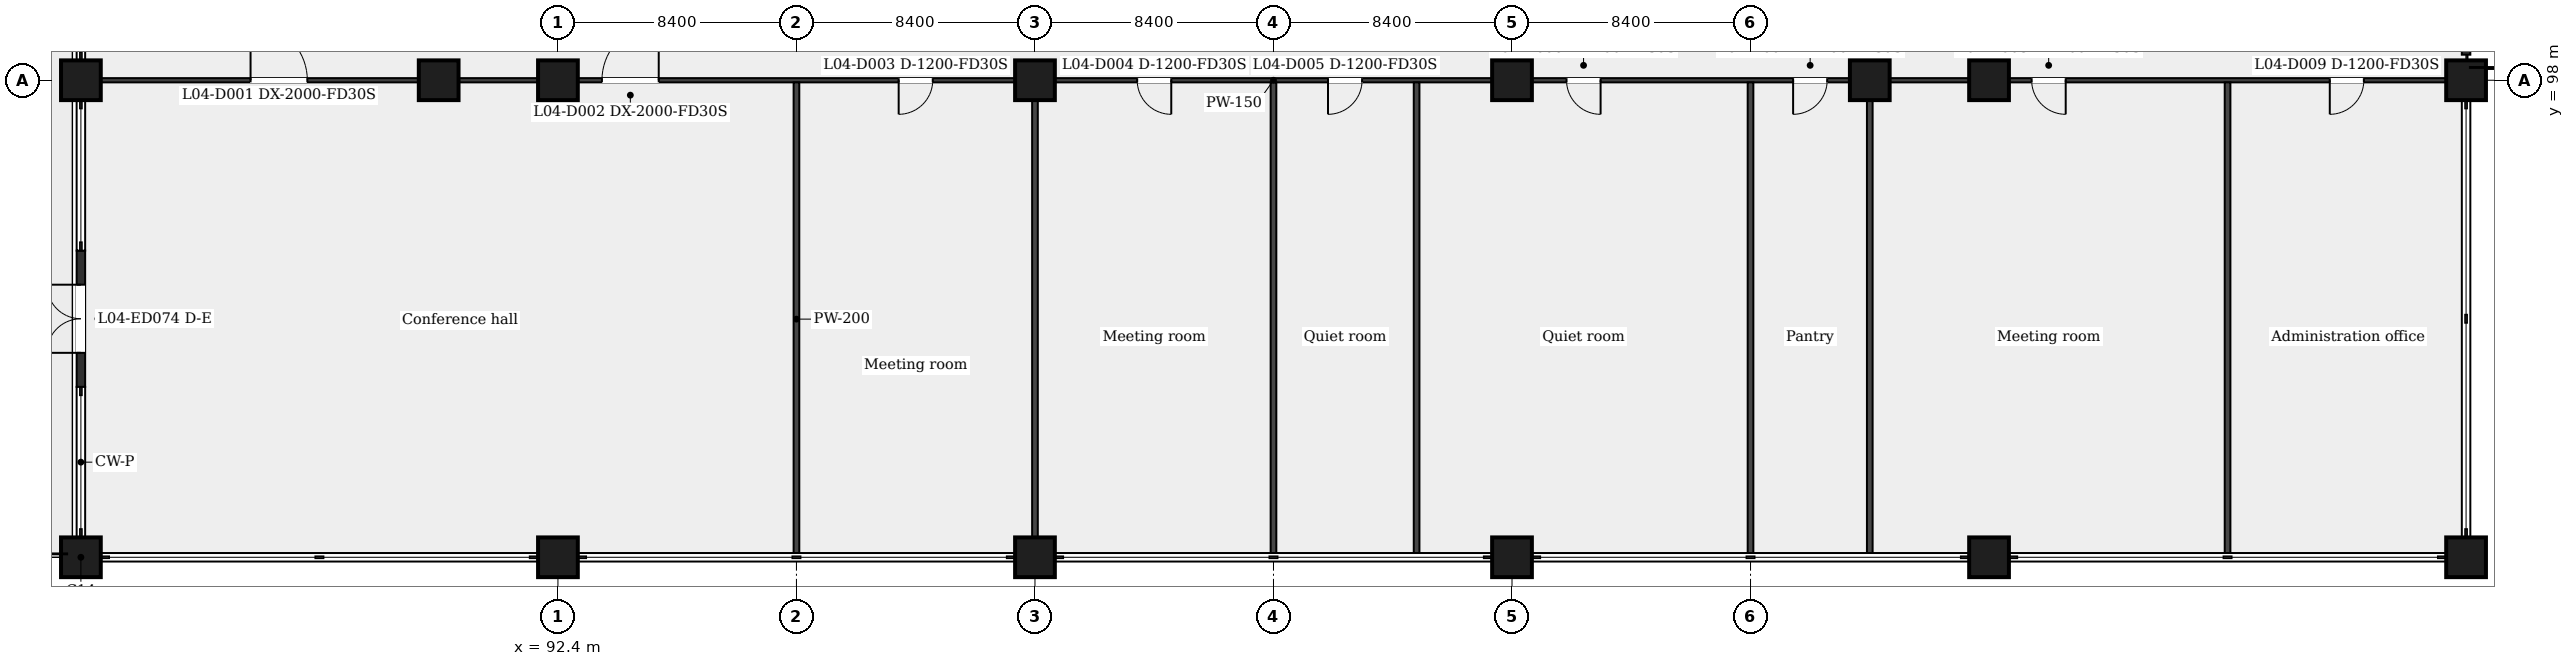
"""IFC4 building model, lengths in metres.
Left out: names, types, materials, properties, quantities, classifications, styles, units other than length and angle.
Written with IfcOpenShell. Run it as: python <this file> out.ifc"""

import sys

from ifc_helpers import new_model, si_unit, direction, frame, frame_2d, origin, origin_2d, place, context, subcontext, project, spatial, rectangle, extrude, element, fill, save


model = new_model("IFC4")
c1 = context("Model", 3, precision=1e-05, world=origin(), true_north=direction((0.0, 1.0)))
c2 = subcontext(c1, "Body", "Model", "MODEL_VIEW")
j1 = project(units=[si_unit("LENGTHUNIT", "METRE"), si_unit("PLANEANGLEUNIT", "RADIAN")], contexts=[c1])
p1 = place(None, origin())
s1 = spatial("IfcSite", under=j1, at=p1, CompositionType="ELEMENT")
p2 = place(p1, origin())
s2 = spatial("IfcBuilding", under=s1, at=p2, CompositionType="ELEMENT")
p3 = place(p2, frame((0.0, 0.0, 29.0)))
s3 = spatial("IfcBuildingStorey", under=s2, at=p3, CompositionType="ELEMENT", Elevation=29.0)
for number, where, z_axis, x_axis in (
    (1, (75.6, 81.2, 0.0), (0.0, 0.0, 1.0), (1.0, 0.0, 0.0)),
    (2, (92.4, 81.2, 0.0), (0.0, 0.0, 1.0), (1.0, 0.0, 0.0)),
    (3, (109.2, 81.2, 0.0), (0.0, 0.0, 1.0), (1.0, 0.0, 0.0)),
    (4, (126.0, 81.2, 0.0), (0.0, 0.0, 1.0), (1.0, 0.0, 0.0)),
    (5, (142.8, 81.2, 0.0), (0.0, 0.0, 1.0), (1.0, 0.0, 0.0)),
    (6, (159.6, 81.2, 0.0), (0.0, 0.0, 1.0), (1.0, 0.0, 0.0)),
    (7, (75.6, 98.0, 0.0), (0.0, 0.0, 1.0), (1.0, 0.0, 0.0)),
    (8, (88.2, 98.0, 0.0), (0.0, 0.0, 1.0), (1.0, 0.0, 0.0)),
    (9, (92.4, 98.0, 0.0), (0.0, 0.0, 1.0), (1.0, 0.0, 0.0)),
    (10, (109.2, 98.0, 0.0), (0.0, 0.0, 1.0), (1.0, 0.0, 0.0)),
    (11, (126.0, 98.0, 0.0), (0.0, 0.0, 1.0), (1.0, 0.0, 0.0)),
    (12, (138.6, 98.0, 0.0), (0.0, 0.0, 1.0), (1.0, 0.0, 0.0)),
    (13, (142.8, 98.0, 0.0), (0.0, 0.0, 1.0), (1.0, 0.0, 0.0)),
    (14, (159.6, 98.0, 0.0), (0.0, 0.0, 1.0), (1.0, 0.0, 0.0)),
):
    element("IfcColumn", number, at=place(p3, frame(where, z_axis=z_axis, x_axis=x_axis)), inside=s3, PredefinedType="COLUMN", context=c2, shape_type="SweptSolid", body=[
        extrude(rectangle(XDim=1.4, YDim=1.4, at=origin_2d()), origin(), (0.0, 0.0, 1.0), 5.0),
    ])
p4 = place(p3, frame((75.6, 87.2, 0.0), z_axis=(0.0, 0.0, 1.0), x_axis=(0.0, 1.0, 0.0)))
e15 = element("IfcWall", 15, at=p4, inside=s3, PredefinedType="SOLIDWALL", context=c2, shape_type="SweptSolid", body=[
    extrude(rectangle(XDim=4.8, YDim=0.3, at=frame_2d((2.4, 0.0))), origin(), (0.0, 0.0, 1.0), 4.4),
])
p5 = place(p4, frame((1.2, 0.0, 0.0)))
e16 = element("IfcOpeningElement", 16, at=p5, cuts=e15, PredefinedType="OPENING", context=c2, shape_type="SweptSolid", body=[
    extrude(rectangle(XDim=2.4, YDim=2.4, at=frame_2d((1.2, 1.2))), frame((0.0, 0.16, 0.0), z_axis=(0.0, -1.0, 0.0), x_axis=(1.0, 0.0, 0.0)), (0.0, 0.0, 1.0), 0.32),
])
p6 = place(p3, frame((159.6, 102.5, 0.0), z_axis=(0.0, 0.0, 1.0), x_axis=(0.0, -1.0, 0.0)))
e17 = element("IfcWall", 17, at=p6, inside=s3, PredefinedType="SOLIDWALL", context=c2, shape_type="SweptSolid", body=[
    extrude(rectangle(XDim=3.6, YDim=0.3, at=frame_2d((1.8, 0.0))), origin(), (0.0, 0.0, 1.0), 4.4),
])
p7 = place(p6, frame((0.6, 0.0, 0.0)))
e18 = element("IfcOpeningElement", 18, at=p7, cuts=e17, PredefinedType="OPENING", context=c2, shape_type="SweptSolid", body=[
    extrude(rectangle(XDim=2.4, YDim=2.4, at=frame_2d((1.2, 1.2))), frame((0.0, 0.16, 0.0), z_axis=(0.0, -1.0, 0.0), x_axis=(1.0, 0.0, 0.0)), (0.0, 0.0, 1.0), 0.32),
])
p8 = place(p3, frame((75.65, 98.0, 0.0), z_axis=(0.0, 0.0, 1.0), x_axis=(1.0, 0.0, 0.0)))
e19 = element("IfcWall", 19, at=p8, inside=s3, PredefinedType="PARTITIONING", context=c2, shape_type="SweptSolid", body=[
    extrude(rectangle(XDim=83.9, YDim=0.15, at=frame_2d((41.95, 0.0))), origin(), (0.0, 0.0, 1.0), 4.4),
])
p9 = place(p8, frame((5.925, 0.0, 0.0)))
e20 = element("IfcOpeningElement", 20, at=p9, cuts=e19, PredefinedType="OPENING", context=c2, shape_type="SweptSolid", body=[
    extrude(rectangle(XDim=2.0, YDim=2.1, at=frame_2d((1.0, 1.05))), frame((0.0, 0.085, 0.0), z_axis=(0.0, -1.0, 0.0), x_axis=(1.0, 0.0, 0.0)), (0.0, 0.0, 1.0), 0.17),
])
p10 = place(p8, frame((18.3, 0.0, 0.0)))
e21 = element("IfcOpeningElement", 21, at=p10, cuts=e19, PredefinedType="OPENING", context=c2, shape_type="SweptSolid", body=[
    extrude(rectangle(XDim=2.0, YDim=2.1, at=frame_2d((1.0, 1.05))), frame((0.0, 0.085, 0.0), z_axis=(0.0, -1.0, 0.0), x_axis=(1.0, 0.0, 0.0)), (0.0, 0.0, 1.0), 0.17),
])
p11 = place(p8, frame((28.75, 0.0, 0.0)))
e22 = element("IfcOpeningElement", 22, at=p11, cuts=e19, PredefinedType="OPENING", context=c2, shape_type="SweptSolid", body=[
    extrude(rectangle(XDim=1.2, YDim=2.1, at=frame_2d((0.6, 1.05))), frame((0.0, 0.085, 0.0), z_axis=(0.0, -1.0, 0.0), x_axis=(1.0, 0.0, 0.0)), (0.0, 0.0, 1.0), 0.17),
])
p12 = place(p8, frame((37.15, 0.0, 0.0)))
e23 = element("IfcOpeningElement", 23, at=p12, cuts=e19, PredefinedType="OPENING", context=c2, shape_type="SweptSolid", body=[
    extrude(rectangle(XDim=1.2, YDim=2.1, at=frame_2d((0.6, 1.05))), frame((0.0, 0.085, 0.0), z_axis=(0.0, -1.0, 0.0), x_axis=(1.0, 0.0, 0.0)), (0.0, 0.0, 1.0), 0.17),
])
p13 = place(p8, frame((43.87, 0.0, 0.0)))
e24 = element("IfcOpeningElement", 24, at=p13, cuts=e19, PredefinedType="OPENING", context=c2, shape_type="SweptSolid", body=[
    extrude(rectangle(XDim=1.2, YDim=2.1, at=frame_2d((0.6, 1.05))), frame((0.0, 0.085, 0.0), z_axis=(0.0, -1.0, 0.0), x_axis=(1.0, 0.0, 0.0)), (0.0, 0.0, 1.0), 0.17),
])
p14 = place(p8, frame((52.27, 0.0, 0.0)))
e25 = element("IfcOpeningElement", 25, at=p14, cuts=e19, PredefinedType="OPENING", context=c2, shape_type="SweptSolid", body=[
    extrude(rectangle(XDim=1.2, YDim=2.1, at=frame_2d((0.6, 1.05))), frame((0.0, 0.085, 0.0), z_axis=(0.0, -1.0, 0.0), x_axis=(1.0, 0.0, 0.0)), (0.0, 0.0, 1.0), 0.17),
])
p15 = place(p8, frame((60.25, 0.0, 0.0)))
e26 = element("IfcOpeningElement", 26, at=p15, cuts=e19, PredefinedType="OPENING", context=c2, shape_type="SweptSolid", body=[
    extrude(rectangle(XDim=1.2, YDim=2.1, at=frame_2d((0.6, 1.05))), frame((0.0, 0.085, 0.0), z_axis=(0.0, -1.0, 0.0), x_axis=(1.0, 0.0, 0.0)), (0.0, 0.0, 1.0), 0.17),
])
p16 = place(p8, frame((68.65, 0.0, 0.0)))
e27 = element("IfcOpeningElement", 27, at=p16, cuts=e19, PredefinedType="OPENING", context=c2, shape_type="SweptSolid", body=[
    extrude(rectangle(XDim=1.2, YDim=2.1, at=frame_2d((0.6, 1.05))), frame((0.0, 0.085, 0.0), z_axis=(0.0, -1.0, 0.0), x_axis=(1.0, 0.0, 0.0)), (0.0, 0.0, 1.0), 0.17),
])
p17 = place(p8, frame((79.15, 0.0, 0.0)))
e28 = element("IfcOpeningElement", 28, at=p17, cuts=e19, PredefinedType="OPENING", context=c2, shape_type="SweptSolid", body=[
    extrude(rectangle(XDim=1.2, YDim=2.1, at=frame_2d((0.6, 1.05))), frame((0.0, 0.085, 0.0), z_axis=(0.0, -1.0, 0.0), x_axis=(1.0, 0.0, 0.0)), (0.0, 0.0, 1.0), 0.17),
])
for number, where, z_axis, x_axis in (
    (29, (100.8, 81.25, 0.0), (0.0, 0.0, 1.0), (0.0, 1.0, 0.0)),
    (30, (109.2, 81.25, 0.0), (0.0, 0.0, 1.0), (0.0, 1.0, 0.0)),
    (31, (117.6, 81.25, 0.0), (0.0, 0.0, 1.0), (0.0, 1.0, 0.0)),
    (32, (122.64, 81.25, 0.0), (0.0, 0.0, 1.0), (0.0, 1.0, 0.0)),
    (33, (134.4, 81.25, 0.0), (0.0, 0.0, 1.0), (0.0, 1.0, 0.0)),
    (34, (138.6, 81.25, 0.0), (0.0, 0.0, 1.0), (0.0, 1.0, 0.0)),
    (35, (151.2, 81.25, 0.0), (0.0, 0.0, 1.0), (0.0, 1.0, 0.0)),
):
    element("IfcWall", number, at=place(p3, frame(where, z_axis=z_axis, x_axis=x_axis)), inside=s3, PredefinedType="PARTITIONING", context=c2, shape_type="SweptSolid", body=[
        extrude(rectangle(XDim=16.675, YDim=0.2, at=frame_2d((8.337, 0.0))), origin(), (0.0, 0.0, 1.0), 4.4),
    ])
p18 = place(p5, origin())
e36 = element("IfcDoor", 36, at=p18, inside=s3, OperationType="DOUBLE_DOOR_DOUBLE_SWING", PredefinedType="DOOR", context=c2, shape_type="SweptSolid", body=[
    extrude(rectangle(XDim=2.4, YDim=2.4, at=frame_2d((1.2, 1.2))), frame((0.0, 0.025, 0.0), z_axis=(0.0, -1.0, 0.0), x_axis=(1.0, 0.0, 0.0)), (0.0, 0.0, 1.0), 0.05),
])
fill(e16, e36)
p19 = place(p9, origin())
e37 = element("IfcDoor", 37, at=p19, inside=s3, OperationType="SINGLE_SWING_LEFT", PredefinedType="DOOR", context=c2, shape_type="SweptSolid", body=[
    extrude(rectangle(XDim=2.0, YDim=2.1, at=frame_2d((1.0, 1.05))), frame((0.0, 0.025, 0.0), z_axis=(0.0, -1.0, 0.0), x_axis=(1.0, 0.0, 0.0)), (0.0, 0.0, 1.0), 0.05),
])
fill(e20, e37)
p20 = place(p10, origin())
e38 = element("IfcDoor", 38, at=p20, inside=s3, OperationType="SINGLE_SWING_RIGHT", PredefinedType="DOOR", context=c2, shape_type="SweptSolid", body=[
    extrude(rectangle(XDim=2.0, YDim=2.1, at=frame_2d((1.0, 1.05))), frame((0.0, 0.025, 0.0), z_axis=(0.0, -1.0, 0.0), x_axis=(1.0, 0.0, 0.0)), (0.0, 0.0, 1.0), 0.05),
])
fill(e21, e38)
p21 = place(p11, origin())
e39 = element("IfcDoor", 39, at=p21, inside=s3, OperationType="SINGLE_SWING_LEFT", PredefinedType="DOOR", context=c2, shape_type="SweptSolid", body=[
    extrude(rectangle(XDim=1.2, YDim=2.1, at=frame_2d((0.6, 1.05))), frame((0.0, 0.025, 0.0), z_axis=(0.0, -1.0, 0.0), x_axis=(1.0, 0.0, 0.0)), (0.0, 0.0, 1.0), 0.05),
])
fill(e22, e39)
p22 = place(p12, origin())
e40 = element("IfcDoor", 40, at=p22, inside=s3, OperationType="SINGLE_SWING_RIGHT", PredefinedType="DOOR", context=c2, shape_type="SweptSolid", body=[
    extrude(rectangle(XDim=1.2, YDim=2.1, at=frame_2d((0.6, 1.05))), frame((0.0, 0.025, 0.0), z_axis=(0.0, -1.0, 0.0), x_axis=(1.0, 0.0, 0.0)), (0.0, 0.0, 1.0), 0.05),
])
fill(e23, e40)
p23 = place(p13, origin())
e41 = element("IfcDoor", 41, at=p23, inside=s3, OperationType="SINGLE_SWING_LEFT", PredefinedType="DOOR", context=c2, shape_type="SweptSolid", body=[
    extrude(rectangle(XDim=1.2, YDim=2.1, at=frame_2d((0.6, 1.05))), frame((0.0, 0.025, 0.0), z_axis=(0.0, -1.0, 0.0), x_axis=(1.0, 0.0, 0.0)), (0.0, 0.0, 1.0), 0.05),
])
fill(e24, e41)
p24 = place(p14, origin())
e42 = element("IfcDoor", 42, at=p24, inside=s3, OperationType="SINGLE_SWING_RIGHT", PredefinedType="DOOR", context=c2, shape_type="SweptSolid", body=[
    extrude(rectangle(XDim=1.2, YDim=2.1, at=frame_2d((0.6, 1.05))), frame((0.0, 0.025, 0.0), z_axis=(0.0, -1.0, 0.0), x_axis=(1.0, 0.0, 0.0)), (0.0, 0.0, 1.0), 0.05),
])
fill(e25, e42)
p25 = place(p15, origin())
e43 = element("IfcDoor", 43, at=p25, inside=s3, OperationType="SINGLE_SWING_LEFT", PredefinedType="DOOR", context=c2, shape_type="SweptSolid", body=[
    extrude(rectangle(XDim=1.2, YDim=2.1, at=frame_2d((0.6, 1.05))), frame((0.0, 0.025, 0.0), z_axis=(0.0, -1.0, 0.0), x_axis=(1.0, 0.0, 0.0)), (0.0, 0.0, 1.0), 0.05),
])
fill(e26, e43)
p26 = place(p16, origin())
e44 = element("IfcDoor", 44, at=p26, inside=s3, OperationType="SINGLE_SWING_RIGHT", PredefinedType="DOOR", context=c2, shape_type="SweptSolid", body=[
    extrude(rectangle(XDim=1.2, YDim=2.1, at=frame_2d((0.6, 1.05))), frame((0.0, 0.025, 0.0), z_axis=(0.0, -1.0, 0.0), x_axis=(1.0, 0.0, 0.0)), (0.0, 0.0, 1.0), 0.05),
])
fill(e27, e44)
p27 = place(p17, origin())
e45 = element("IfcDoor", 45, at=p27, inside=s3, OperationType="SINGLE_SWING_LEFT", PredefinedType="DOOR", context=c2, shape_type="SweptSolid", body=[
    extrude(rectangle(XDim=1.2, YDim=2.1, at=frame_2d((0.6, 1.05))), frame((0.0, 0.025, 0.0), z_axis=(0.0, -1.0, 0.0), x_axis=(1.0, 0.0, 0.0)), (0.0, 0.0, 1.0), 0.05),
])
fill(e28, e45)
save(model, sys.argv[1])
